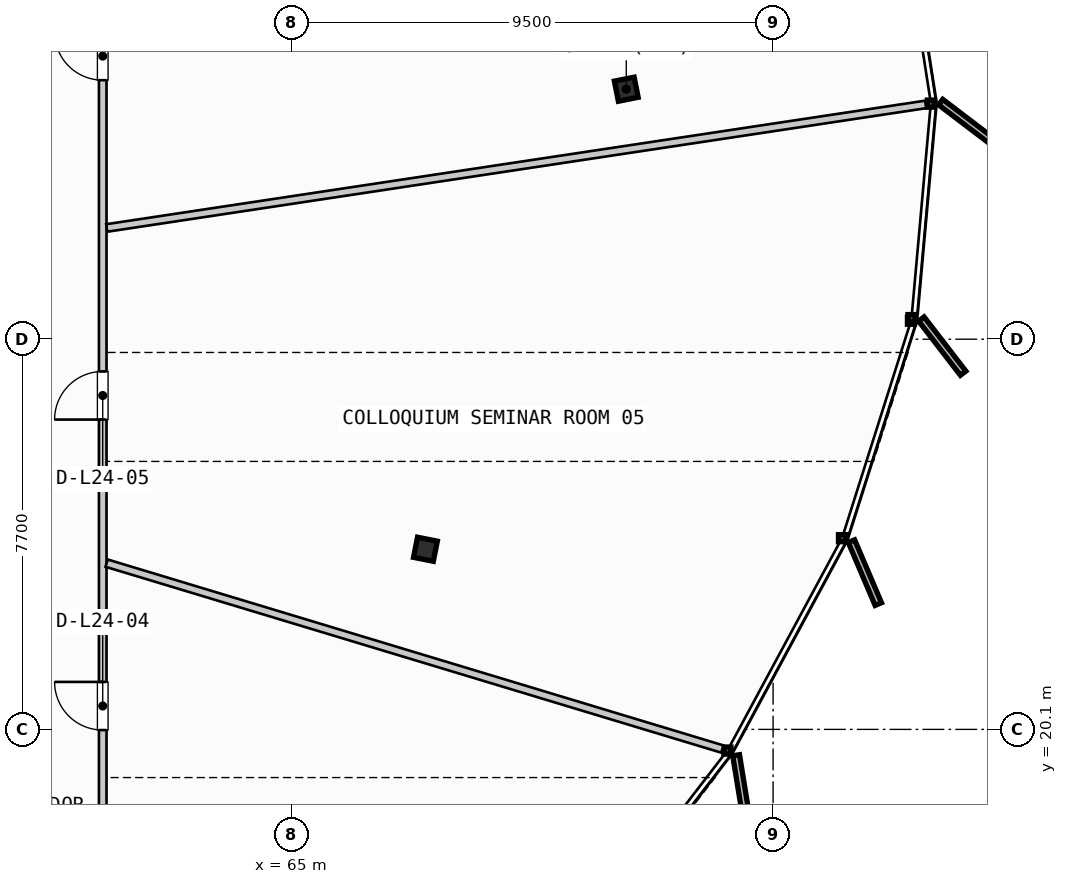
"""IFC4 building model, lengths in metres.
Left out: names, types, materials, properties, quantities, classifications, styles, units other than length and angle.
Written with IfcOpenShell. Run it as: python <this file> out.ifc"""

import sys

from ifc_helpers import new_model, si_unit, direction, frame, frame_2d, origin, origin_2d, place, context, subcontext, project, spatial, rectangle, i_section, extrude, source, transform, mapped, element, fill, save


model = new_model("IFC4")
c1 = context("Model", 3, precision=1e-05, world=origin(), true_north=direction((0.0, 1.0)))
c2 = subcontext(c1, "Body", "Model", "MODEL_VIEW")
j1 = project(units=[si_unit("LENGTHUNIT", "METRE"), si_unit("PLANEANGLEUNIT", "RADIAN")], contexts=[c1])
p1 = place(None, origin())
s1 = spatial("IfcSite", under=j1, at=p1, CompositionType="ELEMENT")
p2 = place(p1, origin())
s2 = spatial("IfcBuilding", under=s1, at=p2, CompositionType="ELEMENT")
p3 = place(p2, frame((0.0, 0.0, 100.0)))
s3 = spatial("IfcBuildingStorey", under=s2, at=p3, CompositionType="ELEMENT", Elevation=100.0)
m1 = source(origin(), c2, "Body", "SweptSolid", [
    extrude(i_section(OverallWidth=0.405, OverallDepth=0.398, WebThickness=0.035, FlangeThickness=0.056, FilletRadius=0.015, at=origin_2d()), origin(), (0.0, 0.0, 1.0), 3.35),
])
for number, where, z_axis, x_axis in (
    (1, (71.603, 32.733, 0.0), (0.0, 0.0, 1.0), (0.981, 0.195, 0.0)),
    (2, (67.639, 23.655, 0.0), (0.0, 0.0, 1.0), (0.981, -0.195, 0.0)),
):
    element("IfcColumn", number, at=place(p3, frame(where, z_axis=z_axis, x_axis=x_axis)), inside=s3, PredefinedType="COLUMN", context=c2, shape_type="MappedRepresentation", body=[
        mapped(m1, transform((0.0, 0.0, 0.0), scale=1.0)),
    ])
p4 = place(p3, frame((61.27, 17.14, 0.0), z_axis=(0.0, 0.0, 1.0), x_axis=(0.0, 1.0, 0.0)))
e3 = element("IfcWall", 3, at=p4, inside=s3, PredefinedType="PARTITIONING", context=c2, shape_type="SweptSolid", body=[
    extrude(rectangle(XDim=20.48, YDim=0.15, at=frame_2d((10.24, 0.0))), origin(), (0.0, 0.0, 1.0), 2.28),
])
p5 = place(p4, frame((2.947, 0.0, 0.0)))
e4 = element("IfcOpeningElement", 4, at=p5, cuts=e3, PredefinedType="OPENING", context=c2, shape_type="SweptSolid", body=[
    extrude(rectangle(XDim=0.95, YDim=2.15, at=frame_2d((0.475, 1.075))), frame((0.0, 0.085, 0.0), z_axis=(0.0, -1.0, 0.0), x_axis=(1.0, 0.0, 0.0)), (0.0, 0.0, 1.0), 0.17),
])
p6 = place(p4, frame((9.074, 0.0, 0.0)))
e5 = element("IfcOpeningElement", 5, at=p6, cuts=e3, PredefinedType="OPENING", context=c2, shape_type="SweptSolid", body=[
    extrude(rectangle(XDim=0.95, YDim=2.15, at=frame_2d((0.475, 1.075))), frame((0.0, 0.085, 0.0), z_axis=(0.0, -1.0, 0.0), x_axis=(1.0, 0.0, 0.0)), (0.0, 0.0, 1.0), 0.17),
])
p7 = place(p4, frame((15.772, 0.0, 0.0)))
e6 = element("IfcOpeningElement", 6, at=p7, cuts=e3, PredefinedType="OPENING", context=c2, shape_type="SweptSolid", body=[
    extrude(rectangle(XDim=0.95, YDim=2.15, at=frame_2d((0.475, 1.075))), frame((0.0, 0.085, 0.0), z_axis=(0.0, -1.0, 0.0), x_axis=(1.0, 0.0, 0.0)), (0.0, 0.0, 1.0), 0.17),
])
p8 = place(p3, frame((61.347, 23.381, 0.0), z_axis=(0.0, 0.0, 1.0), x_axis=(0.957330421748, -0.288995611725, 0.0)))
e7 = element("IfcWall", 7, at=p8, inside=s3, PredefinedType="PARTITIONING", context=c2, shape_type="SweptSolid", body=[
    extrude(rectangle(XDim=12.693, YDim=0.15, at=frame_2d((6.346, 0.0))), origin(), (0.0, 0.0, 1.0), 2.28),
])
p9 = place(p3, frame((61.349, 29.995, 0.0), z_axis=(0.0, 0.0, 1.0), x_axis=(0.988811435939, 0.149170855587, 0.0)))
e8 = element("IfcWall", 8, at=p9, inside=s3, PredefinedType="PARTITIONING", context=c2, shape_type="SweptSolid", body=[
    extrude(rectangle(XDim=16.345, YDim=0.15, at=frame_2d((8.173, 0.0))), origin(), (0.0, 0.0, 1.0), 2.28),
])
m2 = source(origin(), c2, "Body", "SweptSolid", [
    extrude(rectangle(XDim=0.95, YDim=2.15, at=frame_2d((0.475, 1.075))), frame((0.0, 0.025, 0.0), z_axis=(0.0, -1.0, 0.0), x_axis=(1.0, 0.0, 0.0)), (0.0, 0.0, 1.0), 0.05),
])
p10 = place(p5, origin())
e9 = element("IfcDoor", 9, at=p10, inside=s3, OperationType="SINGLE_SWING_RIGHT", PredefinedType="DOOR", context=c2, shape_type="MappedRepresentation", body=[
    mapped(m2, transform((0.0, 0.0, 0.0), scale=1.0)),
])
fill(e4, e9)
p11 = place(p6, origin())
e10 = element("IfcDoor", 10, at=p11, inside=s3, OperationType="SINGLE_SWING_LEFT", PredefinedType="DOOR", context=c2, shape_type="MappedRepresentation", body=[
    mapped(m2, transform((0.0, 0.0, 0.0), scale=1.0)),
])
fill(e5, e10)
p12 = place(p7, origin())
e11 = element("IfcDoor", 11, at=p12, inside=s3, OperationType="SINGLE_SWING_RIGHT", PredefinedType="DOOR", context=c2, shape_type="MappedRepresentation", body=[
    mapped(m2, transform((0.0, 0.0, 0.0), scale=1.0)),
])
fill(e6, e11)
save(model, sys.argv[1])
